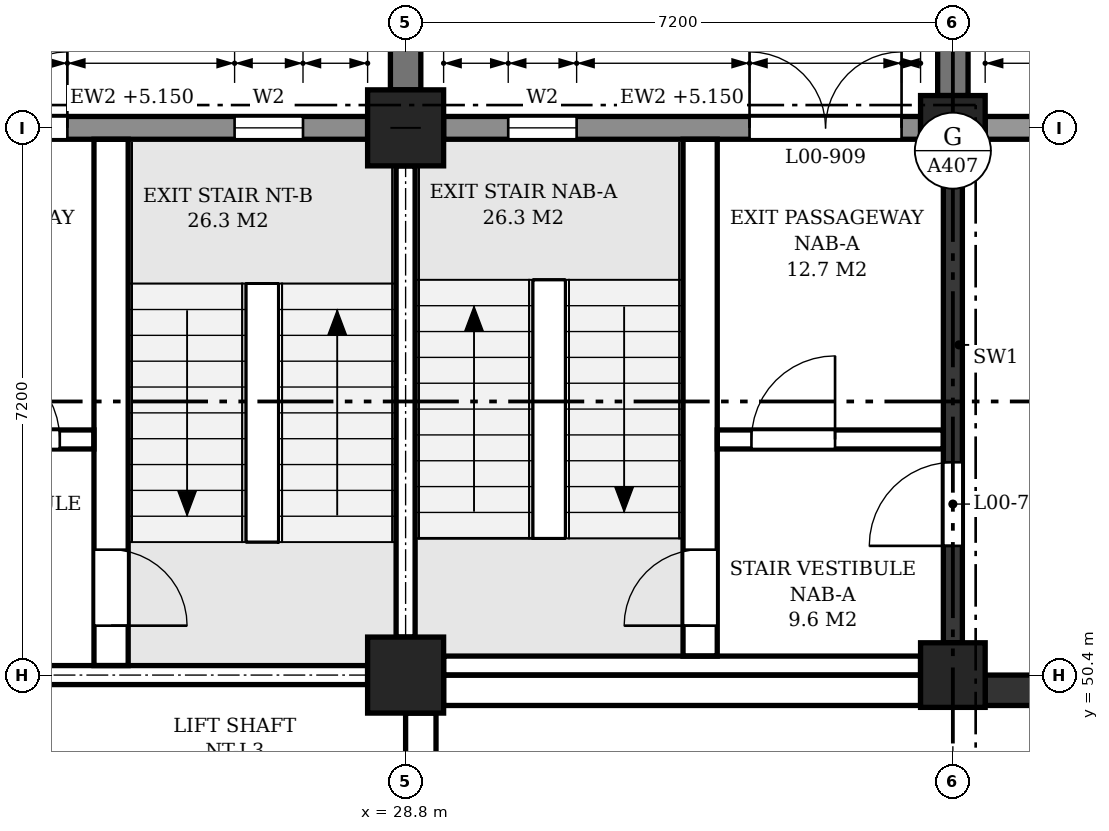
"""IFC4 building model, lengths in metres.
Left out: names, types, materials, properties, quantities, classifications, styles, units other than length and angle.
Written with IfcOpenShell. Run it as: python <this file> out.ifc"""

import sys

from ifc_helpers import new_model, si_unit, direction, frame, frame_2d, origin, origin_2d, place, context, subcontext, project, spatial, polyline, rectangle, outline, extrude, element, fill, save


model = new_model("IFC4")
c1 = context("Model", 3, precision=1e-05, world=origin(), true_north=direction((0.0, 1.0)))
c2 = subcontext(c1, "Body", "Model", "MODEL_VIEW")
j1 = project(units=[si_unit("LENGTHUNIT", "METRE"), si_unit("PLANEANGLEUNIT", "RADIAN")], contexts=[c1])
p1 = place(None, origin())
s1 = spatial("IfcSite", under=j1, at=p1, CompositionType="ELEMENT")
p2 = place(p1, origin())
s2 = spatial("IfcBuilding", under=s1, at=p2, CompositionType="ELEMENT")
p3 = place(p2, origin())
s3 = spatial("IfcBuildingStorey", under=s2, at=p3, CompositionType="ELEMENT", Elevation=0.0)
for number, where, z_axis, x_axis in (
    (1, (28.8, 50.4, 0.0), (0.0, 0.0, 1.0), (1.0, 0.0, 0.0)),
    (2, (28.8, 57.6, 0.0), (0.0, 0.0, 1.0), (1.0, 0.0, 0.0)),
):
    element("IfcColumn", number, at=place(p3, frame(where, z_axis=z_axis, x_axis=x_axis)), inside=s3, PredefinedType="COLUMN", context=c2, shape_type="SweptSolid", body=[
        extrude(rectangle(XDim=1.0, YDim=1.0, at=origin_2d()), origin(), (0.0, 0.0, 1.0), 6.0),
    ])
for number, where, z_axis, x_axis in (
    (3, (36.0, 50.4, 0.0), (0.0, 0.0, 1.0), (1.0, 0.0, 0.0)),
    (4, (36.0, 57.6, 0.0), (0.0, 0.0, 1.0), (1.0, 0.0, 0.0)),
):
    element("IfcColumn", number, at=place(p3, frame(where, z_axis=z_axis, x_axis=x_axis)), inside=s3, PredefinedType="COLUMN", context=c2, shape_type="SweptSolid", body=[
        extrude(rectangle(XDim=0.85, YDim=0.85, at=origin_2d()), origin(), (0.0, 0.0, 1.0), 6.0),
    ])
p4 = place(p3, frame((42.775, 57.6, 0.0), z_axis=(0.0, 0.0, 1.0), x_axis=(-1.0, 0.0, 0.0)))
e5 = element("IfcWall", 5, at=p4, inside=s3, PredefinedType="STANDARD", context=c2, shape_type="SweptSolid", body=[
    extrude(rectangle(XDim=6.35, YDim=0.3, at=frame_2d((3.175, 0.0))), origin(), (0.0, 0.0, 1.0), 5.15),
])
p5 = place(p4, frame((1.975, 0.0, 0.0)))
e6 = element("IfcOpeningElement", 6, at=p5, cuts=e5, PredefinedType="OPENING", context=c2, shape_type="SweptSolid", body=[
    extrude(outline(polyline([(0.0, 0.0), (2.4, 0.0), (2.4, 2.0), (1.2, 3.2), (0.0, 2.0), (0.0, 0.0)])), frame((0.0, 0.16, 0.0), z_axis=(0.0, -1.0, 0.0), x_axis=(1.0, 0.0, 0.0)), (0.0, 0.0, 1.0), 0.32),
])
p6 = place(p3, frame((35.575, 57.6, 0.0), z_axis=(0.0, 0.0, 1.0), x_axis=(-1.0, 0.0, 0.0)))
e7 = element("IfcWall", 7, at=p6, inside=s3, PredefinedType="STANDARD", context=c2, shape_type="SweptSolid", body=[
    extrude(rectangle(XDim=6.275, YDim=0.3, at=frame_2d((3.137, 0.0))), origin(), (0.0, 0.0, 1.0), 5.15),
])
p7 = place(p6, frame((0.25, 0.0, 0.0)))
e8 = element("IfcOpeningElement", 8, at=p7, cuts=e7, PredefinedType="OPENING", context=c2, shape_type="SweptSolid", body=[
    extrude(rectangle(XDim=2.0, YDim=2.1, at=frame_2d((1.0, 1.05))), frame((0.0, 0.16, 0.0), z_axis=(0.0, -1.0, 0.0), x_axis=(1.0, 0.0, 0.0)), (0.0, 0.0, 1.0), 0.32),
])
p8 = place(p6, frame((4.525, 0.0, 0.9)))
e9 = element("IfcOpeningElement", 9, at=p8, cuts=e7, PredefinedType="OPENING", context=c2, shape_type="SweptSolid", body=[
    extrude(outline(polyline([(0.0, 0.0), (0.9, 0.0), (0.9, 3.55), (0.45, 4.0), (0.0, 3.55), (0.0, 0.0)])), frame((0.0, 0.16, 0.0), z_axis=(0.0, -1.0, 0.0), x_axis=(1.0, 0.0, 0.0)), (0.0, 0.0, 1.0), 0.32),
])
p9 = place(p3, frame((28.3, 57.6, 0.0), z_axis=(0.0, 0.0, 1.0), x_axis=(-1.0, 0.0, 0.0)))
e10 = element("IfcWall", 10, at=p9, inside=s3, PredefinedType="STANDARD", context=c2, shape_type="SweptSolid", body=[
    extrude(rectangle(XDim=6.2, YDim=0.3, at=frame_2d((3.1, 0.0))), origin(), (0.0, 0.0, 1.0), 5.15),
])
p10 = place(p9, frame((3.95, 0.0, 0.0)))
e11 = element("IfcOpeningElement", 11, at=p10, cuts=e10, PredefinedType="OPENING", context=c2, shape_type="SweptSolid", body=[
    extrude(rectangle(XDim=2.0, YDim=2.1, at=frame_2d((1.0, 1.05))), frame((0.0, 0.16, 0.0), z_axis=(0.0, -1.0, 0.0), x_axis=(1.0, 0.0, 0.0)), (0.0, 0.0, 1.0), 0.32),
])
p11 = place(p9, frame((0.85, 0.0, 0.9)))
e12 = element("IfcOpeningElement", 12, at=p11, cuts=e10, PredefinedType="OPENING", context=c2, shape_type="SweptSolid", body=[
    extrude(outline(polyline([(0.0, 0.0), (0.9, 0.0), (0.9, 3.55), (0.45, 4.0), (0.0, 3.55), (0.0, 0.0)])), frame((0.0, 0.16, 0.0), z_axis=(0.0, -1.0, 0.0), x_axis=(1.0, 0.0, 0.0)), (0.0, 0.0, 1.0), 0.32),
])
p12 = place(p3, frame((28.8, 58.1, 0.0), z_axis=(0.0, 0.0, 1.0), x_axis=(0.0, 1.0, 0.0)))
e13 = element("IfcWall", 13, at=p12, inside=s3, PredefinedType="POLYGONAL", context=c2, shape_type="SweptSolid", body=[
    extrude(outline(polyline([(1.2, 0.0), (1.2, 20.825), (0.85, 21.35), (0.0, 21.35), (0.0, 0.0), (1.2, 0.0)])), frame((0.0, 0.2, 0.0), z_axis=(0.0, -1.0, 0.0), x_axis=(1.0, 0.0, 0.0)), (0.0, 0.0, 1.0), 0.4),
])
p13 = place(p3, frame((36.0, 58.025, 0.0), z_axis=(0.0, 0.0, 1.0), x_axis=(0.0, 1.0, 0.0)))
e14 = element("IfcWall", 14, at=p13, inside=s3, PredefinedType="POLYGONAL", context=c2, shape_type="SweptSolid", body=[
    extrude(outline(polyline([(1.2, 0.0), (1.2, 9.825), (0.15, 11.4), (0.0, 11.4), (0.0, 0.0), (1.2, 0.0)])), frame((0.0, 0.2, 0.0), z_axis=(0.0, -1.0, 0.0), x_axis=(1.0, 0.0, 0.0)), (0.0, 0.0, 1.0), 0.4),
])
p14 = place(p3, frame((29.3, 50.525, 0.0), z_axis=(0.0, 0.0, 1.0), x_axis=(1.0, 0.0, 0.0)))
e15 = element("IfcWall", 15, at=p14, inside=s3, PredefinedType="SHEAR", context=c2, shape_type="SweptSolid", body=[
    extrude(rectangle(XDim=6.275, YDim=0.25, at=frame_2d((3.137, 0.0))), origin(), (0.0, 0.0, 1.0), 5.05),
])
p15 = place(p3, frame((28.8, 50.9, -0.3), z_axis=(0.0, 0.0, 1.0), x_axis=(0.0, 1.0, 0.0)))
e16 = element("IfcWall", 16, at=p15, inside=s3, PredefinedType="SHEAR", context=c2, shape_type="SweptSolid", body=[
    extrude(rectangle(XDim=6.2, YDim=0.25, at=frame_2d((3.1, 0.0))), origin(), (0.0, 0.0, 1.0), 5.3),
])
p16 = place(p3, frame((36.0, 50.825, 0.0), z_axis=(0.0, 0.0, 1.0), x_axis=(0.0, 1.0, 0.0)))
e17 = element("IfcWall", 17, at=p16, inside=s3, PredefinedType="SHEAR", context=c2, shape_type="SweptSolid", body=[
    extrude(rectangle(XDim=6.35, YDim=0.25, at=frame_2d((3.175, 0.0))), origin(), (0.0, 0.0, 1.0), 5.0),
])
p17 = place(p16, frame((1.275, 0.0, 0.0)))
e18 = element("IfcOpeningElement", 18, at=p17, cuts=e17, PredefinedType="OPENING", context=c2, shape_type="SweptSolid", body=[
    extrude(rectangle(XDim=1.1, YDim=2.1, at=frame_2d((0.55, 1.05))), frame((0.0, 0.135, 0.0), z_axis=(0.0, -1.0, 0.0), x_axis=(1.0, 0.0, 0.0)), (0.0, 0.0, 1.0), 0.27),
])
p18 = place(p3, frame((32.675, 50.65, 0.0), z_axis=(0.0, 0.0, 1.0), x_axis=(0.0, 1.0, 0.0)))
e19 = element("IfcWall", 19, at=p18, inside=s3, PredefinedType="SHEAR", context=c2, shape_type="SweptSolid", body=[
    extrude(rectangle(XDim=6.8, YDim=0.45, at=frame_2d((3.4, 0.0))), origin(), (0.0, 0.0, 1.0), 5.75),
])
p19 = place(p18, frame((0.4, 0.0, 0.0)))
e20 = element("IfcOpeningElement", 20, at=p19, cuts=e19, PredefinedType="OPENING", context=c2, shape_type="SweptSolid", body=[
    extrude(rectangle(XDim=1.0, YDim=2.1, at=frame_2d((0.5, 1.05))), frame((0.0, 0.235, 0.0), z_axis=(0.0, -1.0, 0.0), x_axis=(1.0, 0.0, 0.0)), (0.0, 0.0, 1.0), 0.47),
])
p20 = place(p3, frame((32.9, 53.5, 0.0), z_axis=(0.0, 0.0, 1.0), x_axis=(1.0, 0.0, 0.0)))
e21 = element("IfcWall", 21, at=p20, inside=s3, PredefinedType="SHEAR", context=c2, shape_type="SweptSolid", body=[
    extrude(rectangle(XDim=2.975, YDim=0.25, at=frame_2d((1.488, 0.0))), origin(), (0.0, 0.0, 1.0), 5.75),
])
p21 = place(p20, frame((0.45, 0.0, 0.0)))
e22 = element("IfcOpeningElement", 22, at=p21, cuts=e21, PredefinedType="OPENING", context=c2, shape_type="SweptSolid", body=[
    extrude(rectangle(XDim=1.1, YDim=2.1, at=frame_2d((0.55, 1.05))), frame((0.0, 0.135, 0.0), z_axis=(0.0, -1.0, 0.0), x_axis=(1.0, 0.0, 0.0)), (0.0, 0.0, 1.0), 0.27),
])
p22 = place(p3, frame((22.1, 50.4, 0.0), z_axis=(0.0, 0.0, 1.0), x_axis=(1.0, 0.0, 0.0)))
e23 = element("IfcWall", 23, at=p22, inside=s3, PredefinedType="SHEAR", context=c2, shape_type="SweptSolid", body=[
    extrude(rectangle(XDim=6.2, YDim=0.25, at=frame_2d((3.1, 0.0))), origin(), (0.0, 0.0, 1.0), 5.0),
])
p23 = place(p22, frame((0.35, 0.0, 0.0)))
e24 = element("IfcOpeningElement", 24, at=p23, cuts=e23, PredefinedType="OPENING", context=c2, shape_type="SweptSolid", body=[
    extrude(rectangle(XDim=1.1, YDim=2.1, at=frame_2d((0.55, 1.05))), frame((0.0, 0.135, 0.0), z_axis=(0.0, -1.0, 0.0), x_axis=(1.0, 0.0, 0.0)), (0.0, 0.0, 1.0), 0.27),
])
p24 = place(p3, frame((24.925, 50.525, 0.0), z_axis=(0.0, 0.0, 1.0), x_axis=(0.0, 1.0, 0.0)))
e25 = element("IfcWall", 25, at=p24, inside=s3, PredefinedType="SHEAR", context=c2, shape_type="SweptSolid", body=[
    extrude(rectangle(XDim=6.925, YDim=0.45, at=frame_2d((3.462, 0.0))), origin(), (0.0, 0.0, 1.0), 5.75),
])
p25 = place(p24, frame((0.525, 0.0, 0.0)))
e26 = element("IfcOpeningElement", 26, at=p25, cuts=e25, PredefinedType="OPENING", context=c2, shape_type="SweptSolid", body=[
    extrude(rectangle(XDim=1.0, YDim=2.1, at=frame_2d((0.5, 1.05))), frame((0.0, 0.235, 0.0), z_axis=(0.0, -1.0, 0.0), x_axis=(1.0, 0.0, 0.0)), (0.0, 0.0, 1.0), 0.47),
])
p26 = place(p3, frame((21.725, 53.5, 0.0), z_axis=(0.0, 0.0, 1.0), x_axis=(1.0, 0.0, 0.0)))
e27 = element("IfcWall", 27, at=p26, inside=s3, PredefinedType="SHEAR", context=c2, shape_type="SweptSolid", body=[
    extrude(rectangle(XDim=2.975, YDim=0.25, at=frame_2d((1.487, 0.0))), origin(), (0.0, 0.0, 1.0), 5.75),
])
p27 = place(p26, frame((1.425, 0.0, 0.0)))
e28 = element("IfcOpeningElement", 28, at=p27, cuts=e27, PredefinedType="OPENING", context=c2, shape_type="SweptSolid", body=[
    extrude(rectangle(XDim=1.1, YDim=2.1, at=frame_2d((0.55, 1.05))), frame((0.0, 0.135, 0.0), z_axis=(0.0, -1.0, 0.0), x_axis=(1.0, 0.0, 0.0)), (0.0, 0.0, 1.0), 0.27),
])
p28 = place(p3, frame((29.3, 50.2, 0.0), z_axis=(0.0, 0.0, 1.0), x_axis=(1.0, 0.0, 0.0)))
e29 = element("IfcWall", 29, at=p28, inside=s3, PredefinedType="SOLIDWALL", context=c2, shape_type="SweptSolid", body=[
    extrude(rectangle(XDim=6.275, YDim=0.4, at=frame_2d((3.137, 0.0))), origin(), (0.0, 0.0, 1.0), 10.7),
])
p29 = place(p3, frame((36.425, 50.2, 0.0), z_axis=(0.0, 0.0, 1.0), x_axis=(1.0, 0.0, 0.0)))
e30 = element("IfcWall", 30, at=p29, inside=s3, PredefinedType="SOLIDWALL", context=c2, shape_type="SweptSolid", body=[
    extrude(rectangle(XDim=6.35, YDim=0.4, at=frame_2d((3.175, 0.0))), origin(), (0.0, 0.0, 1.0), 10.7),
])
p30 = place(p3, frame((29.0, 43.7, 0.0), z_axis=(0.0, 0.0, 1.0), x_axis=(0.0, 1.0, 0.0)))
e31 = element("IfcWall", 31, at=p30, inside=s3, PredefinedType="SOLIDWALL", context=c2, shape_type="SweptSolid", body=[
    extrude(rectangle(XDim=6.2, YDim=0.4, at=frame_2d((3.1, 0.0))), origin(), (0.0, 0.0, 1.0), 10.55),
])
p31 = place(p10, frame((2.0, 0.0, 0.0), z_axis=(0.0, 0.0, 1.0), x_axis=(-1.0, 0.0, 0.0)))
e32 = element("IfcDoor", 32, at=p31, inside=s3, OperationType="DOUBLE_DOOR_SINGLE_SWING", PredefinedType="DOOR", context=c2, shape_type="SweptSolid", body=[
    extrude(rectangle(XDim=2.0, YDim=2.1, at=frame_2d((1.0, 1.05))), frame((0.0, 0.025, 0.0), z_axis=(0.0, -1.0, 0.0), x_axis=(1.0, 0.0, 0.0)), (0.0, 0.0, 1.0), 0.05),
])
fill(e11, e32)
p32 = place(p7, frame((2.0, 0.0, 0.0), z_axis=(0.0, 0.0, 1.0), x_axis=(-1.0, 0.0, 0.0)))
e33 = element("IfcDoor", 33, at=p32, inside=s3, OperationType="DOUBLE_DOOR_SINGLE_SWING", PredefinedType="DOOR", context=c2, shape_type="SweptSolid", body=[
    extrude(rectangle(XDim=2.0, YDim=2.1, at=frame_2d((1.0, 1.05))), frame((0.0, 0.025, 0.0), z_axis=(0.0, -1.0, 0.0), x_axis=(1.0, 0.0, 0.0)), (0.0, 0.0, 1.0), 0.05),
])
fill(e8, e33)
p33 = place(p8, origin())
e34 = element("IfcWindow", 34, at=p33, inside=s3, PartitioningType="SINGLE_PANEL", PredefinedType="WINDOW", context=c2, shape_type="SweptSolid", body=[
    extrude(outline(polyline([(0.0, 0.0), (0.9, 0.0), (0.9, 3.55), (0.45, 4.0), (0.0, 3.55), (0.0, 0.0)])), frame((0.0, 0.03, 0.0), z_axis=(0.0, -1.0, 0.0), x_axis=(1.0, 0.0, 0.0)), (0.0, 0.0, 1.0), 0.06),
])
fill(e9, e34)
p34 = place(p11, origin())
e35 = element("IfcWindow", 35, at=p34, inside=s3, PartitioningType="SINGLE_PANEL", PredefinedType="WINDOW", context=c2, shape_type="SweptSolid", body=[
    extrude(outline(polyline([(0.0, 0.0), (0.9, 0.0), (0.9, 3.55), (0.45, 4.0), (0.0, 3.55), (0.0, 0.0)])), frame((0.0, 0.03, 0.0), z_axis=(0.0, -1.0, 0.0), x_axis=(1.0, 0.0, 0.0)), (0.0, 0.0, 1.0), 0.06),
])
fill(e12, e35)
p35 = place(p19, origin())
e36 = element("IfcDoor", 36, at=p35, inside=s3, OperationType="SINGLE_SWING_LEFT", PredefinedType="DOOR", context=c2, shape_type="SweptSolid", body=[
    extrude(rectangle(XDim=1.0, YDim=2.1, at=frame_2d((0.5, 1.05))), frame((0.0, 0.025, 0.0), z_axis=(0.0, -1.0, 0.0), x_axis=(1.0, 0.0, 0.0)), (0.0, 0.0, 1.0), 0.05),
])
fill(e20, e36)
p36 = place(p17, origin())
e37 = element("IfcDoor", 37, at=p36, inside=s3, OperationType="SINGLE_SWING_LEFT", PredefinedType="DOOR", context=c2, shape_type="SweptSolid", body=[
    extrude(rectangle(XDim=1.1, YDim=2.1, at=frame_2d((0.55, 1.05))), frame((0.0, 0.025, 0.0), z_axis=(0.0, -1.0, 0.0), x_axis=(1.0, 0.0, 0.0)), (0.0, 0.0, 1.0), 0.05),
])
fill(e18, e37)
p37 = place(p21, origin())
e38 = element("IfcDoor", 38, at=p37, inside=s3, OperationType="SINGLE_SWING_RIGHT", PredefinedType="DOOR", context=c2, shape_type="SweptSolid", body=[
    extrude(rectangle(XDim=1.1, YDim=2.1, at=frame_2d((0.55, 1.05))), frame((0.0, 0.025, 0.0), z_axis=(0.0, -1.0, 0.0), x_axis=(1.0, 0.0, 0.0)), (0.0, 0.0, 1.0), 0.05),
])
fill(e22, e38)
p38 = place(p25, frame((1.0, 0.0, 0.0), z_axis=(0.0, 0.0, 1.0), x_axis=(-1.0, 0.0, 0.0)))
e39 = element("IfcDoor", 39, at=p38, inside=s3, OperationType="SINGLE_SWING_RIGHT", PredefinedType="DOOR", context=c2, shape_type="SweptSolid", body=[
    extrude(rectangle(XDim=1.0, YDim=2.1, at=frame_2d((0.5, 1.05))), frame((0.0, 0.025, 0.0), z_axis=(0.0, -1.0, 0.0), x_axis=(1.0, 0.0, 0.0)), (0.0, 0.0, 1.0), 0.05),
])
fill(e26, e39)
p39 = place(p27, origin())
e40 = element("IfcDoor", 40, at=p39, inside=s3, OperationType="SINGLE_SWING_LEFT", PredefinedType="DOOR", context=c2, shape_type="SweptSolid", body=[
    extrude(rectangle(XDim=1.1, YDim=2.1, at=frame_2d((0.55, 1.05))), frame((0.0, 0.025, 0.0), z_axis=(0.0, -1.0, 0.0), x_axis=(1.0, 0.0, 0.0)), (0.0, 0.0, 1.0), 0.05),
])
fill(e28, e40)
save(model, sys.argv[1])
